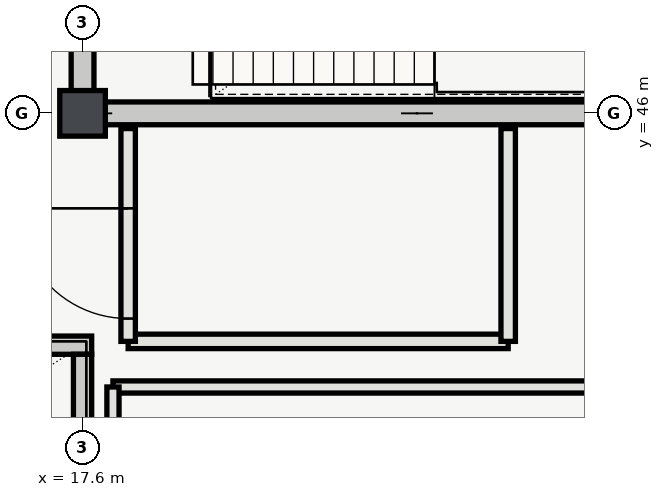
"""IFC4 building model, lengths in metres.
Left out: names, types, materials, properties, quantities, classifications, styles, units other than length and angle.
Written with IfcOpenShell. Run it as: python <this file> out.ifc"""

import sys

from ifc_helpers import new_model, si_unit, direction, frame, frame_2d, origin, origin_2d, place, context, subcontext, project, spatial, rectangle, extrude, element, fill, save


model = new_model("IFC4")
c1 = context("Model", 3, precision=1e-05, world=origin(), true_north=direction((0.0, 1.0)))
c2 = subcontext(c1, "Body", "Model", "MODEL_VIEW")
j1 = project(units=[si_unit("LENGTHUNIT", "METRE"), si_unit("PLANEANGLEUNIT", "RADIAN")], contexts=[c1])
p1 = place(None, origin())
s1 = spatial("IfcSite", under=j1, at=p1, CompositionType="ELEMENT")
p2 = place(p1, origin())
s2 = spatial("IfcBuilding", under=s1, at=p2, CompositionType="ELEMENT")
p3 = place(p2, frame((0.0, 0.0, 37.2)))
s3 = spatial("IfcBuildingStorey", under=s2, at=p3, CompositionType="ELEMENT", Elevation=37.2)
p4 = place(p3, frame((17.6, 46.0, 0.0), z_axis=(0.0, 0.0, 1.0), x_axis=(1.0, 0.0, 0.0)))
e1 = element("IfcColumn", 1, at=p4, inside=s3, PredefinedType="COLUMN", context=c2, shape_type="SweptSolid", body=[
    extrude(rectangle(XDim=0.6, YDim=0.6, at=origin_2d()), origin(), (0.0, 0.0, 1.0), 4.2),
])
p5 = place(p3, frame((17.45, 46.0, 0.0), z_axis=(0.0, 0.0, 1.0), x_axis=(1.0, 0.0, 0.0)))
e2 = element("IfcWall", 2, at=p5, inside=s3, PredefinedType="SHEAR", context=c2, shape_type="SweptSolid", body=[
    extrude(rectangle(XDim=9.1, YDim=0.3, at=frame_2d((4.55, 0.0))), origin(), (0.0, 0.0, 1.0), 3.92),
])
p6 = place(p3, frame((17.6, 46.15, 0.0), z_axis=(0.0, 0.0, 1.0), x_axis=(0.0, 1.0, 0.0)))
e3 = element("IfcWall", 3, at=p6, inside=s3, PredefinedType="SHEAR", context=c2, shape_type="SweptSolid", body=[
    extrude(rectangle(XDim=7.7, YDim=0.3, at=frame_2d((3.85, 0.0))), origin(), (0.0, 0.0, 1.0), 3.92),
])
p7 = place(p6, frame((1.675, 0.0, 0.0)))
e4 = element("IfcOpeningElement", 4, at=p7, cuts=e3, PredefinedType="OPENING", context=c2, shape_type="SweptSolid", body=[
    extrude(rectangle(XDim=1.35, YDim=2.2, at=frame_2d((0.675, 1.1))), frame((0.0, 0.16, 0.0), z_axis=(0.0, -1.0, 0.0), x_axis=(1.0, 0.0, 0.0)), (0.0, 0.0, 1.0), 0.32),
])
p8 = place(p3, frame((18.2, 43.0, 0.0), z_axis=(0.0, 0.0, 1.0), x_axis=(1.0, 0.0, 0.0)))
e5 = element("IfcWall", 5, at=p8, inside=s3, PredefinedType="PARTITIONING", context=c2, shape_type="SweptSolid", body=[
    extrude(rectangle(XDim=5.0, YDim=0.19, at=frame_2d((2.5, 0.0))), origin(), (0.0, 0.0, 1.0), 3.92),
])
p9 = place(p3, frame((18.2, 45.8, 0.0), z_axis=(0.0, 0.0, 1.0), x_axis=(0.0, -1.0, 0.0)))
e6 = element("IfcWall", 6, at=p9, inside=s3, PredefinedType="PARTITIONING", context=c2, shape_type="SweptSolid", body=[
    extrude(rectangle(XDim=2.8, YDim=0.19, at=frame_2d((1.4, 0.0))), origin(), (0.0, 0.0, 1.0), 3.92),
])
p10 = place(p9, frame((1.05, 0.0, 0.0)))
e7 = element("IfcOpeningElement", 7, at=p10, cuts=e6, PredefinedType="OPENING", context=c2, shape_type="SweptSolid", body=[
    extrude(rectangle(XDim=1.45, YDim=2.2, at=frame_2d((0.725, 1.1))), frame((0.0, 0.105, 0.0), z_axis=(0.0, -1.0, 0.0), x_axis=(1.0, 0.0, 0.0)), (0.0, 0.0, 1.0), 0.21),
])
p11 = place(p3, frame((23.2, 43.0, 0.0), z_axis=(0.0, 0.0, 1.0), x_axis=(0.0, 1.0, 0.0)))
e8 = element("IfcWall", 8, at=p11, inside=s3, PredefinedType="PARTITIONING", context=c2, shape_type="SweptSolid", body=[
    extrude(rectangle(XDim=2.8, YDim=0.19, at=frame_2d((1.4, 0.0))), origin(), (0.0, 0.0, 1.0), 3.92),
])
p12 = place(p3, frame((26.2, 42.4, 0.0), z_axis=(0.0, 0.0, 1.0), x_axis=(-1.0, 0.0, 0.0)))
e9 = element("IfcWall", 9, at=p12, inside=s3, PredefinedType="PARTITIONING", context=c2, shape_type="SweptSolid", body=[
    extrude(rectangle(XDim=8.2, YDim=0.16, at=frame_2d((4.1, 0.0))), origin(), (0.0, 0.0, 1.0), 3.92),
])
p13 = place(p3, frame((18.0, 42.4, 0.0), z_axis=(0.0, 0.0, 1.0), x_axis=(0.0, -1.0, 0.0)))
e10 = element("IfcWall", 10, at=p13, inside=s3, PredefinedType="PARTITIONING", context=c2, shape_type="SweptSolid", body=[
    extrude(rectangle(XDim=11.6, YDim=0.16, at=frame_2d((5.8, 0.0))), origin(), (0.0, 0.0, 1.0), 3.92),
])
p14 = place(p3, frame((17.72, 42.95, 0.0), z_axis=(0.0, 0.0, 1.0), x_axis=(-1.0, 0.0, 0.0)))
e11 = element("IfcWall", 11, at=p14, inside=s3, PredefinedType="SHEAR", context=c2, shape_type="SweptSolid", body=[
    extrude(rectangle(XDim=9.04, YDim=0.24, at=frame_2d((4.52, 0.0))), origin(), (0.0, 0.0, 1.0), 3.95),
])
p15 = place(p3, frame((17.6, 38.67, 0.0), z_axis=(0.0, 0.0, 1.0), x_axis=(0.0, 1.0, 0.0)))
e12 = element("IfcWall", 12, at=p15, inside=s3, PredefinedType="SHEAR", context=c2, shape_type="SweptSolid", body=[
    extrude(rectangle(XDim=4.16, YDim=0.24, at=frame_2d((2.08, 0.0))), origin(), (0.0, 0.0, 1.0), 3.95),
])
p16 = place(p10, origin())
e13 = element("IfcDoor", 13, at=p16, inside=s3, OperationType="SINGLE_SWING_LEFT", PredefinedType="DOOR", context=c2, shape_type="SweptSolid", body=[
    extrude(rectangle(XDim=1.45, YDim=2.2, at=frame_2d((0.725, 1.1))), frame((0.0, 0.025, 0.0), z_axis=(0.0, -1.0, 0.0), x_axis=(1.0, 0.0, 0.0)), (0.0, 0.0, 1.0), 0.05),
])
fill(e7, e13)
save(model, sys.argv[1])
